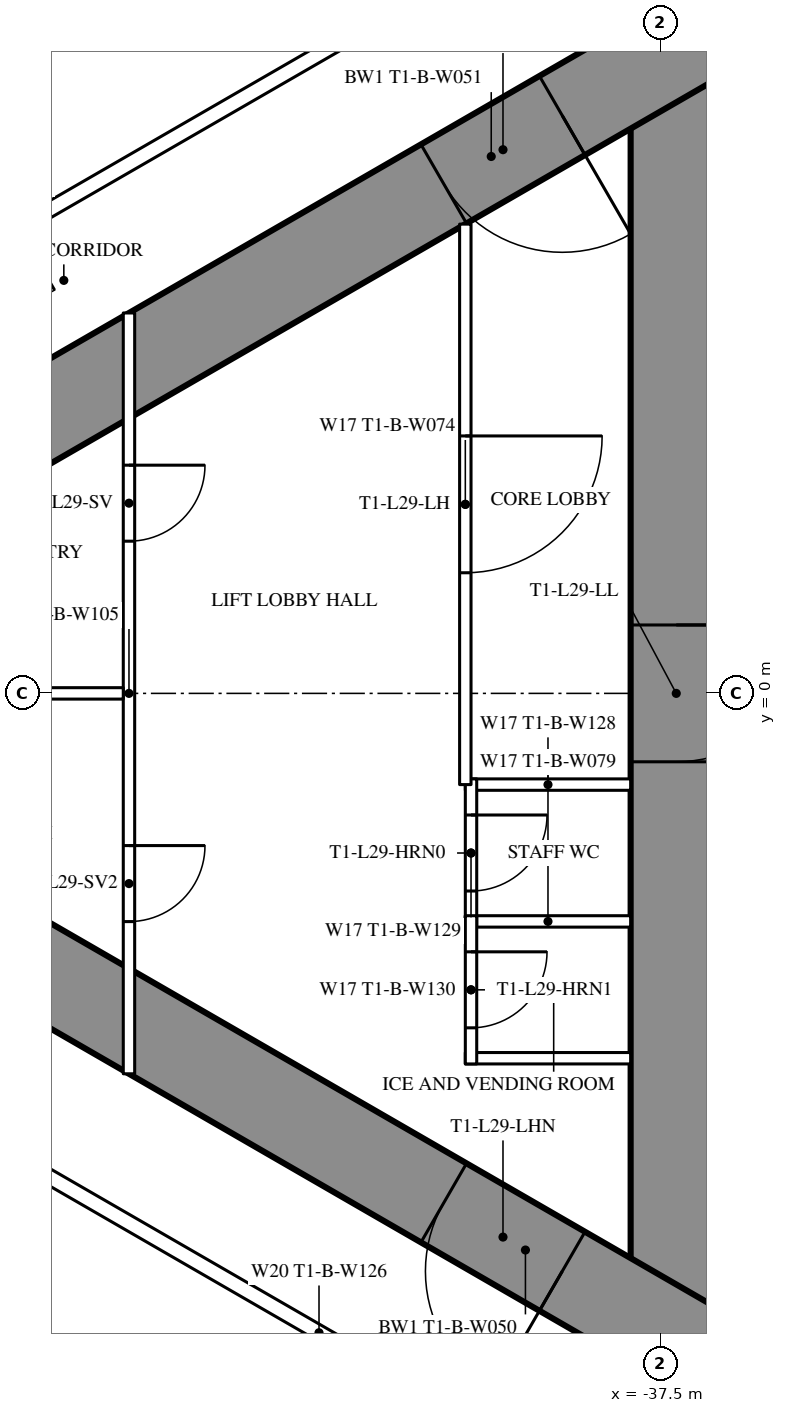
"""IFC4 building model, lengths in metres.
Left out: names, types, materials, properties, quantities, classifications, styles, units other than length and angle.
Written with IfcOpenShell. Run it as: python <this file> out.ifc"""

import sys

from ifc_helpers import new_model, si_unit, direction, frame, frame_2d, origin, place, context, subcontext, project, spatial, rectangle, extrude, element, fill, save


model = new_model("IFC4")
c1 = context("Model", 3, precision=1e-05, world=origin(), true_north=direction((0.0, 1.0)))
c2 = subcontext(c1, "Body", "Model", "MODEL_VIEW")
j1 = project(units=[si_unit("LENGTHUNIT", "METRE"), si_unit("PLANEANGLEUNIT", "RADIAN")], contexts=[c1])
p1 = place(None, origin())
s1 = spatial("IfcSite", under=j1, at=p1, CompositionType="ELEMENT")
p2 = place(p1, origin())
s2 = spatial("IfcBuilding", under=s1, at=p2, CompositionType="ELEMENT")
p3 = place(p2, frame((0.0, 0.0, 111.6)))
s3 = spatial("IfcBuildingStorey", under=s2, at=p3, CompositionType="ELEMENT", Elevation=111.6)
p4 = place(p3, frame((-37.3, 8.6, 0.0), z_axis=(0.0, 0.0, 1.0), x_axis=(0.0, -1.0, 0.0)))
e1 = element("IfcWall", 1, at=p4, inside=s3, PredefinedType="SHEAR", context=c2, shape_type="SweptSolid", body=[
    extrude(rectangle(XDim=17.2, YDim=1.2, at=frame_2d((8.6, 0.0))), origin(), (0.0, 0.0, 1.0), 3.5),
])
p5 = place(p4, frame((7.7, 0.0, 0.0)))
e2 = element("IfcOpeningElement", 2, at=p5, cuts=e1, PredefinedType="OPENING", context=c2, shape_type="SweptSolid", body=[
    extrude(rectangle(XDim=1.8, YDim=2.2, at=frame_2d((0.9, 1.1))), frame((0.0, 0.61, 0.0), z_axis=(0.0, -1.0, 0.0), x_axis=(1.0, 0.0, 0.0)), (0.0, 0.0, 1.0), 1.22),
])
p6 = place(p3, frame((-27.2, 14.3, 0.0), z_axis=(0.0, 0.0, 1.0), x_axis=(-0.866026593062, -0.499997940104, 0.0)))
e3 = element("IfcWall", 3, at=p6, inside=s3, PredefinedType="SHEAR", context=c2, shape_type="SweptSolid", body=[
    extrude(rectangle(XDim=28.946, YDim=1.2, at=frame_2d((14.473, 0.0))), origin(), (0.0, 0.0, 1.0), 3.5),
])
p7 = place(p6, frame((4.6, 0.0, 0.0)))
e4 = element("IfcOpeningElement", 4, at=p7, cuts=e3, PredefinedType="OPENING", context=c2, shape_type="SweptSolid", body=[
    extrude(rectangle(XDim=1.0, YDim=2.2, at=frame_2d((0.5, 1.1))), frame((0.0, 0.61, 0.0), z_axis=(0.0, -1.0, 0.0), x_axis=(1.0, 0.0, 0.0)), (0.0, 0.0, 1.0), 1.22),
])
p8 = place(p6, frame((13.395, 0.0, 0.0)))
e5 = element("IfcOpeningElement", 5, at=p8, cuts=e3, PredefinedType="OPENING", context=c2, shape_type="SweptSolid", body=[
    extrude(rectangle(XDim=1.8, YDim=2.2, at=frame_2d((0.9, 1.1))), frame((0.0, 0.61, 0.0), z_axis=(0.0, -1.0, 0.0), x_axis=(1.0, 0.0, 0.0)), (0.0, 0.0, 1.0), 1.22),
])
p9 = place(p3, frame((-27.2, -14.3, 0.0), z_axis=(0.0, 0.0, 1.0), x_axis=(-0.866024021859, 0.500002393557, 0.0)))
e6 = element("IfcWall", 6, at=p9, inside=s3, PredefinedType="SHEAR", context=c2, shape_type="SweptSolid", body=[
    extrude(rectangle(XDim=27.907, YDim=1.2, at=frame_2d((13.954, 0.0))), origin(), (0.0, 0.0, 1.0), 3.5),
])
p10 = place(p9, frame((4.6, 0.0, 0.0)))
e7 = element("IfcOpeningElement", 7, at=p10, cuts=e6, PredefinedType="OPENING", context=c2, shape_type="SweptSolid", body=[
    extrude(rectangle(XDim=1.0, YDim=2.2, at=frame_2d((0.5, 1.1))), frame((0.0, 0.61, 0.0), z_axis=(0.0, -1.0, 0.0), x_axis=(1.0, 0.0, 0.0)), (0.0, 0.0, 1.0), 1.22),
])
p11 = place(p9, frame((13.395, 0.0, 0.0)))
e8 = element("IfcOpeningElement", 8, at=p11, cuts=e6, PredefinedType="OPENING", context=c2, shape_type="SweptSolid", body=[
    extrude(rectangle(XDim=1.8, YDim=2.2, at=frame_2d((0.9, 1.1))), frame((0.0, 0.61, 0.0), z_axis=(0.0, -1.0, 0.0), x_axis=(1.0, 0.0, 0.0)), (0.0, 0.0, 1.0), 1.22),
])
p12 = place(p3, frame((-37.7, 10.894, 0.0), z_axis=(0.0, 0.0, 1.0), x_axis=(-0.866027905338, -0.499995667157, 0.0)))
e9 = element("IfcWall", 9, at=p12, inside=s3, PredefinedType="PARTITIONING", context=c2, shape_type="SweptSolid", body=[
    extrude(rectangle(XDim=21.787, YDim=0.2, at=frame_2d((10.894, 0.0))), origin(), (0.0, 0.0, 1.0), 3.25),
])
p13 = place(p12, frame((11.23, 0.0, 0.0)))
e10 = element("IfcOpeningElement", 10, at=p13, cuts=e9, PredefinedType="OPENING", context=c2, shape_type="SweptSolid", body=[
    extrude(rectangle(XDim=0.95, YDim=2.2, at=frame_2d((0.475, 1.1))), frame((0.0, 0.11, 0.0), z_axis=(0.0, -1.0, 0.0), x_axis=(1.0, 0.0, 0.0)), (0.0, 0.0, 1.0), 0.22),
])
p14 = place(p12, frame((9.531, 0.0, 0.0)))
e11 = element("IfcOpeningElement", 11, at=p14, cuts=e9, PredefinedType="OPENING", context=c2, shape_type="SweptSolid", body=[
    extrude(rectangle(XDim=0.95, YDim=2.2, at=frame_2d((0.475, 1.1))), frame((0.0, 0.11, 0.0), z_axis=(0.0, -1.0, 0.0), x_axis=(1.0, 0.0, 0.0)), (0.0, 0.0, 1.0), 0.22),
])
p15 = place(p3, frame((-36.92, -11.344, 0.0), z_axis=(0.0, 0.0, 1.0), x_axis=(-0.866027897759, 0.499995680284, 0.0)))
e12 = element("IfcWall", 12, at=p15, inside=s3, PredefinedType="PARTITIONING", context=c2, shape_type="SweptSolid", body=[
    extrude(rectangle(XDim=11.731, YDim=0.2, at=frame_2d((5.865, 0.0))), origin(), (0.0, 0.0, 1.0), 3.25),
])
p16 = place(p15, frame((3.35, 0.0, 0.0)))
e13 = element("IfcOpeningElement", 13, at=p16, cuts=e12, PredefinedType="OPENING", context=c2, shape_type="SweptSolid", body=[
    extrude(rectangle(XDim=1.0, YDim=2.2, at=frame_2d((0.5, 1.1))), frame((0.0, 0.11, 0.0), z_axis=(0.0, -1.0, 0.0), x_axis=(1.0, 0.0, 0.0)), (0.0, 0.0, 1.0), 0.22),
])
for number, where, z_axis, x_axis in (
    (14, (-37.9, -1.2, 0.0), (0.0, 0.0, 1.0), (-1.0, 0.0, 0.0)),
    (15, (-37.9, -3.0, 0.0), (0.0, 0.0, 1.0), (-1.0, 0.0, 0.0)),
    (16, (-37.9, -4.8, 0.0), (0.0, 0.0, 1.0), (-1.0, 0.0, 0.0)),
):
    element("IfcWall", number, at=place(p3, frame(where, z_axis=z_axis, x_axis=x_axis)), inside=s3, PredefinedType="PARTITIONING", context=c2, shape_type="SweptSolid", body=[
        extrude(rectangle(XDim=2.175, YDim=0.15, at=frame_2d((1.087, 0.0))), origin(), (0.0, 0.0, 1.0), 3.25),
    ])
p17 = place(p3, frame((-40.0, -1.125, 0.0), z_axis=(0.0, 0.0, 1.0), x_axis=(0.0, -1.0, 0.0)))
e17 = element("IfcWall", 17, at=p17, inside=s3, PredefinedType="PARTITIONING", context=c2, shape_type="SweptSolid", body=[
    extrude(rectangle(XDim=1.95, YDim=0.15, at=frame_2d((0.975, 0.0))), origin(), (0.0, 0.0, 1.0), 3.25),
])
p18 = place(p17, frame((0.475, 0.0, 0.0)))
e18 = element("IfcOpeningElement", 18, at=p18, cuts=e17, PredefinedType="OPENING", context=c2, shape_type="SweptSolid", body=[
    extrude(rectangle(XDim=1.0, YDim=2.2, at=frame_2d((0.5, 1.1))), frame((0.0, 0.085, 0.0), z_axis=(0.0, -1.0, 0.0), x_axis=(1.0, 0.0, 0.0)), (0.0, 0.0, 1.0), 0.17),
])
p19 = place(p3, frame((-40.0, -2.925, 0.0), z_axis=(0.0, 0.0, 1.0), x_axis=(0.0, -1.0, 0.0)))
e19 = element("IfcWall", 19, at=p19, inside=s3, PredefinedType="PARTITIONING", context=c2, shape_type="SweptSolid", body=[
    extrude(rectangle(XDim=1.95, YDim=0.15, at=frame_2d((0.975, 0.0))), origin(), (0.0, 0.0, 1.0), 3.25),
])
p20 = place(p19, frame((0.475, 0.0, 0.0)))
e20 = element("IfcOpeningElement", 20, at=p20, cuts=e19, PredefinedType="OPENING", context=c2, shape_type="SweptSolid", body=[
    extrude(rectangle(XDim=1.0, YDim=2.2, at=frame_2d((0.5, 1.1))), frame((0.0, 0.085, 0.0), z_axis=(0.0, -1.0, 0.0), x_axis=(1.0, 0.0, 0.0)), (0.0, 0.0, 1.0), 0.17),
])
p21 = place(p3, frame((-40.075, 6.174, 0.0), z_axis=(0.0, 0.0, 1.0), x_axis=(0.0, -1.0, 0.0)))
e21 = element("IfcWall", 21, at=p21, inside=s3, PredefinedType="PARTITIONING", context=c2, shape_type="SweptSolid", body=[
    extrude(rectangle(XDim=7.374, YDim=0.15, at=frame_2d((3.687, 0.0))), origin(), (0.0, 0.0, 1.0), 3.25),
])
p22 = place(p21, frame((2.787, 0.0, 0.0)))
e22 = element("IfcOpeningElement", 22, at=p22, cuts=e21, PredefinedType="OPENING", context=c2, shape_type="SweptSolid", body=[
    extrude(rectangle(XDim=1.8, YDim=2.2, at=frame_2d((0.9, 1.1))), frame((0.0, 0.085, 0.0), z_axis=(0.0, -1.0, 0.0), x_axis=(1.0, 0.0, 0.0)), (0.0, 0.0, 1.0), 0.17),
])
p23 = place(p3, frame((-44.5, 5.005, 0.0), z_axis=(0.0, 0.0, 1.0), x_axis=(0.0, -1.0, 0.0)))
e23 = element("IfcWall", 23, at=p23, inside=s3, PredefinedType="PARTITIONING", context=c2, shape_type="SweptSolid", body=[
    extrude(rectangle(XDim=10.009, YDim=0.15, at=frame_2d((5.005, 0.0))), origin(), (0.0, 0.0, 1.0), 2.45),
])
p24 = place(p23, frame((2.002, 0.0, 0.0)))
e24 = element("IfcOpeningElement", 24, at=p24, cuts=e23, PredefinedType="OPENING", context=c2, shape_type="SweptSolid", body=[
    extrude(rectangle(XDim=1.0, YDim=2.2, at=frame_2d((0.5, 1.1))), frame((0.0, 0.085, 0.0), z_axis=(0.0, -1.0, 0.0), x_axis=(1.0, 0.0, 0.0)), (0.0, 0.0, 1.0), 0.17),
])
p25 = place(p23, frame((7.007, 0.0, 0.0)))
e25 = element("IfcOpeningElement", 25, at=p25, cuts=e23, PredefinedType="OPENING", context=c2, shape_type="SweptSolid", body=[
    extrude(rectangle(XDim=1.0, YDim=2.2, at=frame_2d((0.5, 1.1))), frame((0.0, 0.085, 0.0), z_axis=(0.0, -1.0, 0.0), x_axis=(1.0, 0.0, 0.0)), (0.0, 0.0, 1.0), 0.17),
])
p26 = place(p3, frame((-44.575, 0.0, 0.0), z_axis=(0.0, 0.0, 1.0), x_axis=(-1.0, 0.0, 0.0)))
e26 = element("IfcWall", 26, at=p26, inside=s3, PredefinedType="PARTITIONING", context=c2, shape_type="SweptSolid", body=[
    extrude(rectangle(XDim=8.593, YDim=0.15, at=frame_2d((4.297, 0.0))), origin(), (0.0, 0.0, 1.0), 2.2),
])
p27 = place(p18, origin())
e27 = element("IfcDoor", 27, at=p27, inside=s3, OperationType="SINGLE_SWING_LEFT", PredefinedType="DOOR", context=c2, shape_type="SweptSolid", body=[
    extrude(rectangle(XDim=1.0, YDim=2.2, at=frame_2d((0.5, 1.1))), frame((0.0, 0.025, 0.0), z_axis=(0.0, -1.0, 0.0), x_axis=(1.0, 0.0, 0.0)), (0.0, 0.0, 1.0), 0.05),
])
fill(e18, e27)
p28 = place(p20, origin())
e28 = element("IfcDoor", 28, at=p28, inside=s3, OperationType="SINGLE_SWING_LEFT", PredefinedType="DOOR", context=c2, shape_type="SweptSolid", body=[
    extrude(rectangle(XDim=1.0, YDim=2.2, at=frame_2d((0.5, 1.1))), frame((0.0, 0.025, 0.0), z_axis=(0.0, -1.0, 0.0), x_axis=(1.0, 0.0, 0.0)), (0.0, 0.0, 1.0), 0.05),
])
fill(e20, e28)
p29 = place(p22, origin())
e29 = element("IfcDoor", 29, at=p29, inside=s3, OperationType="DOUBLE_DOOR_SINGLE_SWING", PredefinedType="DOOR", context=c2, shape_type="SweptSolid", body=[
    extrude(rectangle(XDim=1.8, YDim=2.2, at=frame_2d((0.9, 1.1))), frame((0.0, 0.025, 0.0), z_axis=(0.0, -1.0, 0.0), x_axis=(1.0, 0.0, 0.0)), (0.0, 0.0, 1.0), 0.05),
])
fill(e22, e29)
p30 = place(p24, origin())
e30 = element("IfcDoor", 30, at=p30, inside=s3, OperationType="SINGLE_SWING_LEFT", PredefinedType="DOOR", context=c2, shape_type="SweptSolid", body=[
    extrude(rectangle(XDim=1.0, YDim=2.2, at=frame_2d((0.5, 1.1))), frame((0.0, 0.025, 0.0), z_axis=(0.0, -1.0, 0.0), x_axis=(1.0, 0.0, 0.0)), (0.0, 0.0, 1.0), 0.05),
])
fill(e24, e30)
p31 = place(p25, origin())
e31 = element("IfcDoor", 31, at=p31, inside=s3, OperationType="SINGLE_SWING_LEFT", PredefinedType="DOOR", context=c2, shape_type="SweptSolid", body=[
    extrude(rectangle(XDim=1.0, YDim=2.2, at=frame_2d((0.5, 1.1))), frame((0.0, 0.025, 0.0), z_axis=(0.0, -1.0, 0.0), x_axis=(1.0, 0.0, 0.0)), (0.0, 0.0, 1.0), 0.05),
])
fill(e25, e31)
p32 = place(p8, origin())
e32 = element("IfcDoor", 32, at=p32, inside=s3, OperationType="DOUBLE_DOOR_SINGLE_SWING", PredefinedType="DOOR", context=c2, shape_type="SweptSolid", body=[
    extrude(rectangle(XDim=1.8, YDim=2.2, at=frame_2d((0.9, 1.1))), frame((0.0, 0.025, 0.0), z_axis=(0.0, -1.0, 0.0), x_axis=(1.0, 0.0, 0.0)), (0.0, 0.0, 1.0), 0.05),
])
fill(e5, e32)
p33 = place(p11, origin())
e33 = element("IfcDoor", 33, at=p33, inside=s3, OperationType="DOUBLE_DOOR_SINGLE_SWING", PredefinedType="DOOR", context=c2, shape_type="SweptSolid", body=[
    extrude(rectangle(XDim=1.8, YDim=2.2, at=frame_2d((0.9, 1.1))), frame((0.0, 0.025, 0.0), z_axis=(0.0, -1.0, 0.0), x_axis=(1.0, 0.0, 0.0)), (0.0, 0.0, 1.0), 0.05),
])
fill(e8, e33)
p34 = place(p5, origin())
e34 = element("IfcDoor", 34, at=p34, inside=s3, OperationType="DOUBLE_DOOR_SINGLE_SWING", PredefinedType="DOOR", context=c2, shape_type="SweptSolid", body=[
    extrude(rectangle(XDim=1.8, YDim=2.2, at=frame_2d((0.9, 1.1))), frame((0.0, 0.025, 0.0), z_axis=(0.0, -1.0, 0.0), x_axis=(1.0, 0.0, 0.0)), (0.0, 0.0, 1.0), 0.05),
])
fill(e2, e34)
save(model, sys.argv[1])
